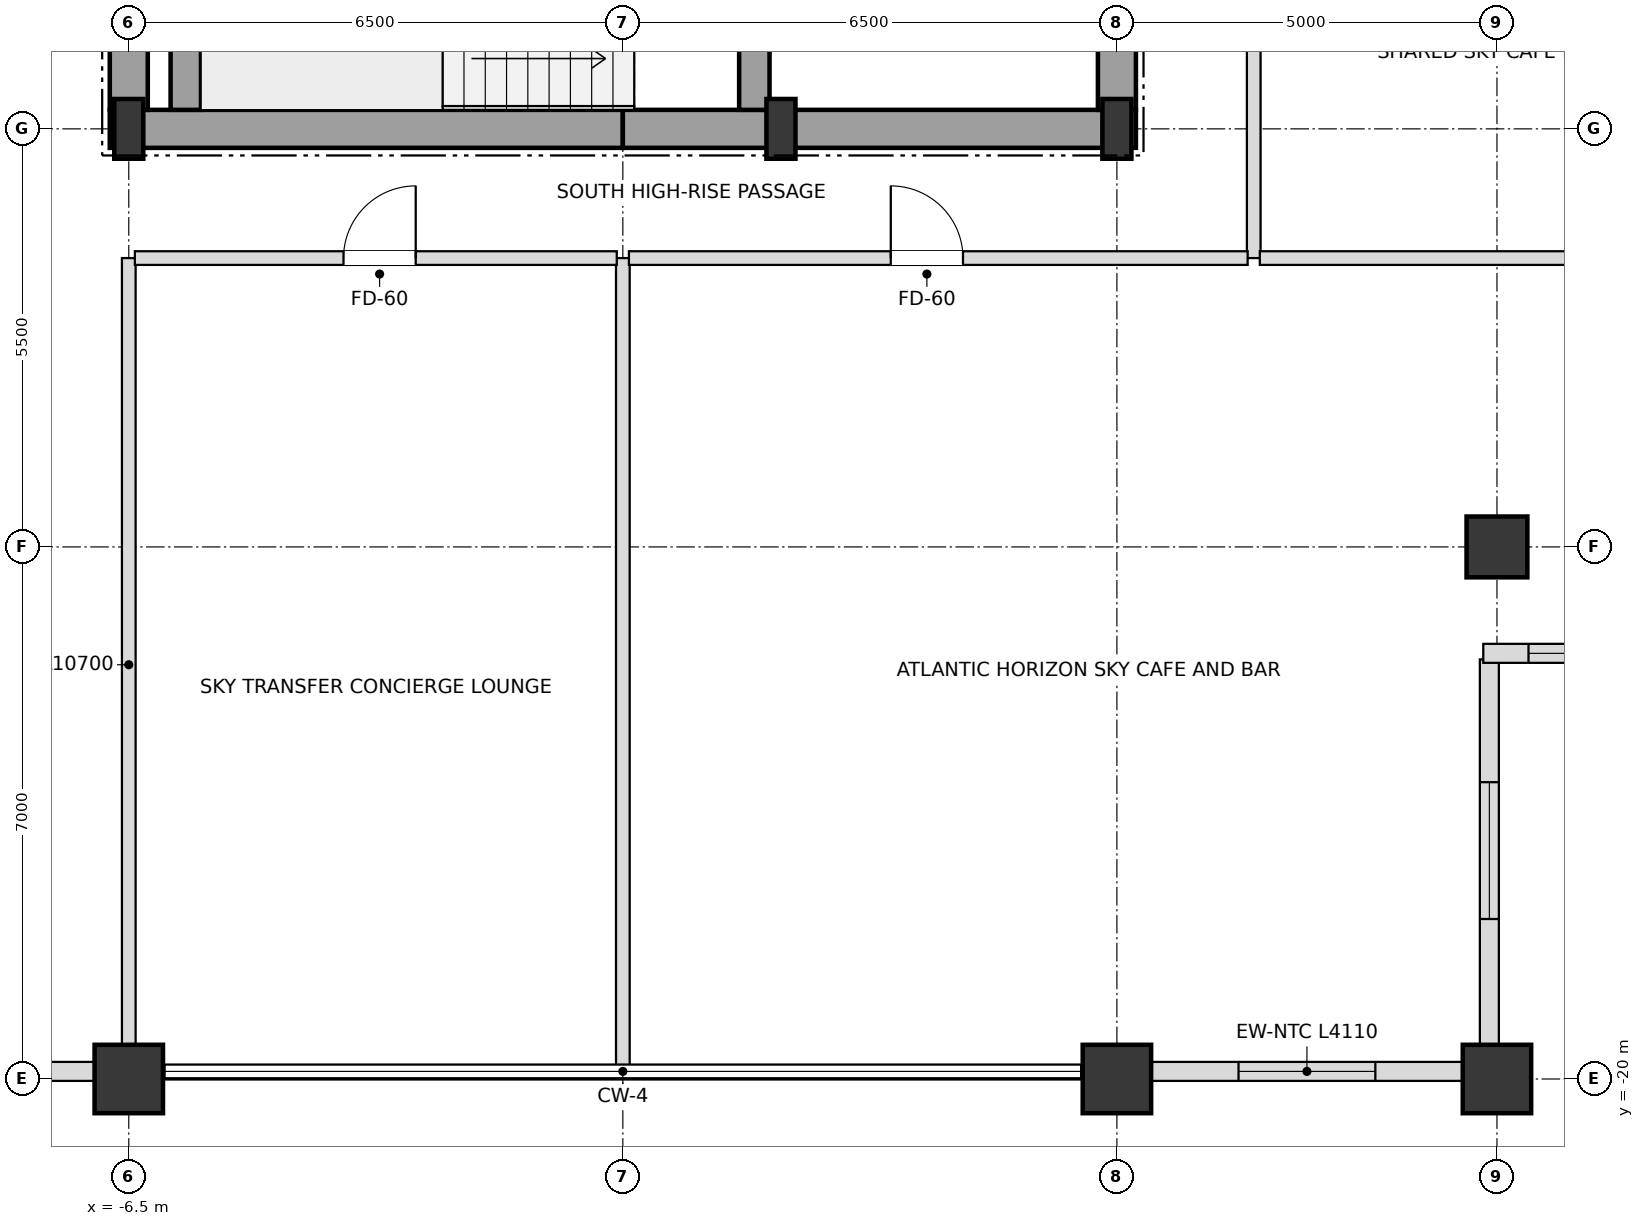
"""IFC4 building model, lengths in metres.
Left out: names, types, materials, properties, quantities, classifications, styles, units other than length and angle.
Written with IfcOpenShell. Run it as: python <this file> out.ifc"""

import sys

from ifc_helpers import new_model, si_unit, direction, frame, frame_2d, origin, origin_2d, place, context, subcontext, project, spatial, rectangle, i_section, extrude, element, fill, save


model = new_model("IFC4")
c1 = context("Model", 3, precision=1e-05, world=origin(), true_north=direction((0.0, 1.0)))
c2 = subcontext(c1, "Body", "Model", "MODEL_VIEW")
j1 = project(units=[si_unit("LENGTHUNIT", "METRE"), si_unit("PLANEANGLEUNIT", "RADIAN")], contexts=[c1])
p1 = place(None, origin())
s1 = spatial("IfcSite", under=j1, at=p1, CompositionType="ELEMENT")
p2 = place(p1, origin())
s2 = spatial("IfcBuilding", under=s1, at=p2, CompositionType="ELEMENT")
p3 = place(p2, frame((0.0, 0.0, 222.3)))
s3 = spatial("IfcBuildingStorey", under=s2, at=p3, CompositionType="ELEMENT", Elevation=222.3)
for number, where, z_axis, x_axis in (
    (1, (-6.5, -7.5, 0.0), (0.0, 0.0, 1.0), (1.0, 0.0, 0.0)),
    (2, (2.08, -7.5, 0.0), (0.0, 0.0, 1.0), (1.0, 0.0, 0.0)),
    (3, (6.5, -7.5, 0.0), (0.0, 0.0, 1.0), (1.0, 0.0, 0.0)),
):
    element("IfcColumn", number, at=place(p3, frame(where, z_axis=z_axis, x_axis=x_axis)), inside=s3, PredefinedType="COLUMN", context=c2, shape_type="SweptSolid", body=[
        extrude(i_section(OverallWidth=0.382, OverallDepth=0.786, WebThickness=0.02, FlangeThickness=0.033, at=origin_2d()), origin(), (0.0, 0.0, 1.0), 3.6),
    ])
for number, where, z_axis, x_axis in (
    (4, (-6.5, -20.0, 0.0), (0.0, 0.0, 1.0), (1.0, 0.0, 0.0)),
    (5, (6.5, -20.0, 0.0), (0.0, 0.0, 1.0), (1.0, 0.0, 0.0)),
    (6, (11.5, -20.0, 0.0), (0.0, 0.0, 1.0), (1.0, 0.0, 0.0)),
):
    element("IfcColumn", number, at=place(p3, frame(where, z_axis=z_axis, x_axis=x_axis)), inside=s3, PredefinedType="USERDEFINED", context=c2, shape_type="SweptSolid", body=[
        extrude(rectangle(XDim=0.9, YDim=0.9, at=origin_2d()), origin(), (0.0, 0.0, 1.0), 3.6),
    ])
p4 = place(p3, frame((11.5, -13.0, 0.0), z_axis=(0.0, 0.0, 1.0), x_axis=(1.0, 0.0, 0.0)))
e7 = element("IfcColumn", 7, at=p4, inside=s3, PredefinedType="COLUMN", context=c2, shape_type="SweptSolid", body=[
    extrude(rectangle(XDim=0.8, YDim=0.8, at=origin_2d()), origin(), (0.0, 0.0, 1.0), 3.6),
])
p5 = place(p3, frame((-11.055, -19.9, 0.0), z_axis=(0.0, 0.0, 1.0), x_axis=(1.0, 0.0, 0.0)))
e8 = element("IfcWall", 8, at=p5, inside=s3, PredefinedType="SOLIDWALL", context=c2, shape_type="SweptSolid", body=[
    extrude(rectangle(XDim=4.11, YDim=0.25, at=frame_2d((2.055, 0.0))), origin(), (0.0, 0.0, 1.0), 2.748),
])
p6 = place(p5, frame((1.155, 0.0, 0.72)))
e9 = element("IfcOpeningElement", 9, at=p6, cuts=e8, PredefinedType="OPENING", context=c2, shape_type="SweptSolid", body=[
    extrude(rectangle(XDim=1.8, YDim=1.68, at=frame_2d((0.9, 0.84))), frame((0.0, 0.135, 0.0), z_axis=(0.0, -1.0, 0.0), x_axis=(1.0, 0.0, 0.0)), (0.0, 0.0, 1.0), 0.27),
])
p7 = place(p3, frame((6.945, -19.9, 0.0), z_axis=(0.0, 0.0, 1.0), x_axis=(1.0, 0.0, 0.0)))
e10 = element("IfcWall", 10, at=p7, inside=s3, PredefinedType="SOLIDWALL", context=c2, shape_type="SweptSolid", body=[
    extrude(rectangle(XDim=4.11, YDim=0.25, at=frame_2d((2.055, 0.0))), origin(), (0.0, 0.0, 1.0), 2.748),
])
p8 = place(p7, frame((1.155, 0.0, 0.72)))
e11 = element("IfcOpeningElement", 11, at=p8, cuts=e10, PredefinedType="OPENING", context=c2, shape_type="SweptSolid", body=[
    extrude(rectangle(XDim=1.8, YDim=1.68, at=frame_2d((0.9, 0.84))), frame((0.0, 0.135, 0.0), z_axis=(0.0, -1.0, 0.0), x_axis=(1.0, 0.0, 0.0)), (0.0, 0.0, 1.0), 0.27),
])
p9 = place(p3, frame((11.4, -19.82, 0.0), z_axis=(0.0, 0.0, 1.0), x_axis=(0.0, 1.0, 0.0)))
e12 = element("IfcWall", 12, at=p9, inside=s3, PredefinedType="SOLIDWALL", context=c2, shape_type="SweptSolid", body=[
    extrude(rectangle(XDim=5.34, YDim=0.25, at=frame_2d((2.67, 0.0))), origin(), (0.0, 0.0, 1.0), 2.748),
])
p10 = place(p9, frame((1.925, 0.0, 0.72)))
e13 = element("IfcOpeningElement", 13, at=p10, cuts=e12, PredefinedType="OPENING", context=c2, shape_type="SweptSolid", body=[
    extrude(rectangle(XDim=1.8, YDim=1.68, at=frame_2d((0.9, 0.84))), frame((0.0, 0.135, 0.0), z_axis=(0.0, -1.0, 0.0), x_axis=(1.0, 0.0, 0.0)), (0.0, 0.0, 1.0), 0.27),
])
p11 = place(p3, frame((11.32, -14.4, 0.0), z_axis=(0.0, 0.0, 1.0), x_axis=(1.0, 0.0, 0.0)))
e14 = element("IfcWall", 14, at=p11, inside=s3, PredefinedType="SOLIDWALL", context=c2, shape_type="SweptSolid", body=[
    extrude(rectangle(XDim=5.66, YDim=0.25, at=frame_2d((2.83, 0.0))), origin(), (0.0, 0.0, 1.0), 2.748),
])
p12 = place(p11, frame((0.595, 0.0, 0.72)))
e15 = element("IfcOpeningElement", 15, at=p12, cuts=e14, PredefinedType="OPENING", context=c2, shape_type="SweptSolid", body=[
    extrude(rectangle(XDim=1.8, YDim=1.68, at=frame_2d((0.9, 0.84))), frame((0.0, 0.135, 0.0), z_axis=(0.0, -1.0, 0.0), x_axis=(1.0, 0.0, 0.0)), (0.0, 0.0, 1.0), 0.27),
])
p13 = place(p11, frame((3.265, 0.0, 0.72)))
e16 = element("IfcOpeningElement", 16, at=p13, cuts=e14, PredefinedType="OPENING", context=c2, shape_type="SweptSolid", body=[
    extrude(rectangle(XDim=1.8, YDim=1.68, at=frame_2d((0.9, 0.84))), frame((0.0, 0.135, 0.0), z_axis=(0.0, -1.0, 0.0), x_axis=(1.0, 0.0, 0.0)), (0.0, 0.0, 1.0), 0.27),
])
for number, where, z_axis, x_axis in (
    (17, (-6.75, -7.5, 0.0), (0.0, 0.0, 1.0), (1.0, 0.0, 0.0)),
    (18, (0.0, -7.5, 0.0), (0.0, 0.0, 1.0), (1.0, 0.0, 0.0)),
):
    element("IfcWall", number, at=place(p3, frame(where, z_axis=z_axis, x_axis=x_axis)), inside=s3, PredefinedType="SHEAR", context=c2, shape_type="SweptSolid", body=[
        extrude(rectangle(XDim=6.75, YDim=0.5, at=frame_2d((3.375, 0.0))), origin(), (0.0, 0.0, 1.0), 3.38),
    ])
p14 = place(p3, frame((-6.5, -7.25, 0.0), z_axis=(0.0, 0.0, 1.0), x_axis=(0.0, 1.0, 0.0)))
e19 = element("IfcWall", 19, at=p14, inside=s3, PredefinedType="SHEAR", context=c2, shape_type="SweptSolid", body=[
    extrude(rectangle(XDim=3.55, YDim=0.5, at=frame_2d((1.775, 0.0))), origin(), (0.0, 0.0, 1.0), 3.38),
])
p15 = place(p3, frame((6.5, -7.25, 0.0), z_axis=(0.0, 0.0, 1.0), x_axis=(0.0, 1.0, 0.0)))
e20 = element("IfcWall", 20, at=p15, inside=s3, PredefinedType="SHEAR", context=c2, shape_type="SweptSolid", body=[
    extrude(rectangle(XDim=5.75, YDim=0.5, at=frame_2d((2.875, 0.0))), origin(), (0.0, 0.0, 1.0), 3.38),
])
p16 = place(p15, frame((0.85, 0.0, 0.0)))
e21 = element("IfcOpeningElement", 21, at=p16, cuts=e20, PredefinedType="OPENING", context=c2, shape_type="SweptSolid", body=[
    extrude(rectangle(XDim=1.05, YDim=2.15, at=frame_2d((0.525, 1.075))), frame((0.0, 0.26, 0.0), z_axis=(0.0, -1.0, 0.0), x_axis=(1.0, 0.0, 0.0)), (0.0, 0.0, 1.0), 0.52),
])
p17 = place(p3, frame((-5.75, -7.25, 0.0), z_axis=(0.0, 0.0, 1.0), x_axis=(0.0, 1.0, 0.0)))
e22 = element("IfcWall", 22, at=p17, inside=s3, PredefinedType="SHEAR", context=c2, shape_type="SweptSolid", body=[
    extrude(rectangle(XDim=2.9, YDim=0.4, at=frame_2d((1.45, 0.0))), origin(), (0.0, 0.0, 1.0), 3.38),
])
p18 = place(p3, frame((1.73, -7.25, 0.0), z_axis=(0.0, 0.0, 1.0), x_axis=(0.0, 1.0, 0.0)))
e23 = element("IfcWall", 23, at=p18, inside=s3, PredefinedType="SHEAR", context=c2, shape_type="SweptSolid", body=[
    extrude(rectangle(XDim=3.3, YDim=0.4, at=frame_2d((1.65, 0.0))), origin(), (0.0, 0.0, 1.0), 3.38),
])
p19 = place(p18, frame((0.9, 0.0, 0.0)))
e24 = element("IfcOpeningElement", 24, at=p19, cuts=e23, PredefinedType="OPENING", context=c2, shape_type="SweptSolid", body=[
    extrude(rectangle(XDim=1.05, YDim=2.15, at=frame_2d((0.525, 1.075))), frame((0.0, 0.21, 0.0), z_axis=(0.0, -1.0, 0.0), x_axis=(1.0, 0.0, 0.0)), (0.0, 0.0, 1.0), 0.42),
])
p20 = place(p3, frame((-6.5, -19.9, 0.0), z_axis=(0.0, 0.0, 1.0), x_axis=(0.0, 1.0, 0.0)))
e25 = element("IfcWall", 25, at=p20, inside=s3, PredefinedType="PARTITIONING", context=c2, shape_type="SweptSolid", body=[
    extrude(rectangle(XDim=10.7, YDim=0.18, at=frame_2d((5.35, 0.0))), origin(), (0.0, 0.0, 1.0), 2.826),
])
p21 = place(p3, frame((0.0, -19.9, 0.0), z_axis=(0.0, 0.0, 1.0), x_axis=(0.0, 1.0, 0.0)))
e26 = element("IfcWall", 26, at=p21, inside=s3, PredefinedType="PARTITIONING", context=c2, shape_type="SweptSolid", body=[
    extrude(rectangle(XDim=10.7, YDim=0.18, at=frame_2d((5.35, 0.0))), origin(), (0.0, 0.0, 1.0), 3.018),
])
p22 = place(p3, frame((8.3, -9.2, 0.0), z_axis=(0.0, 0.0, 1.0), x_axis=(0.0, 1.0, 0.0)))
e27 = element("IfcWall", 27, at=p22, inside=s3, PredefinedType="PARTITIONING", context=c2, shape_type="SweptSolid", body=[
    extrude(rectangle(XDim=5.4, YDim=0.18, at=frame_2d((2.7, 0.0))), origin(), (0.0, 0.0, 1.0), 2.826),
])
p23 = place(p22, frame((3.125, 0.0, 0.0)))
e28 = element("IfcOpeningElement", 28, at=p23, cuts=e27, PredefinedType="OPENING", context=c2, shape_type="SweptSolid", body=[
    extrude(rectangle(XDim=0.95, YDim=2.15, at=frame_2d((0.475, 1.075))), frame((0.0, 0.1, 0.0), z_axis=(0.0, -1.0, 0.0), x_axis=(1.0, 0.0, 0.0)), (0.0, 0.0, 1.0), 0.2),
])
p24 = place(p3, frame((-6.42, -9.2, 0.0), z_axis=(0.0, 0.0, 1.0), x_axis=(1.0, 0.0, 0.0)))
e29 = element("IfcWall", 29, at=p24, inside=s3, PredefinedType="PARTITIONING", context=c2, shape_type="SweptSolid", body=[
    extrude(rectangle(XDim=6.34, YDim=0.18, at=frame_2d((3.17, 0.0))), origin(), (0.0, 0.0, 1.0), 3.38),
])
p25 = place(p24, frame((2.745, 0.0, 0.0)))
e30 = element("IfcOpeningElement", 30, at=p25, cuts=e29, PredefinedType="OPENING", context=c2, shape_type="SweptSolid", body=[
    extrude(rectangle(XDim=0.95, YDim=2.15, at=frame_2d((0.475, 1.075))), frame((0.0, 0.1, 0.0), z_axis=(0.0, -1.0, 0.0), x_axis=(1.0, 0.0, 0.0)), (0.0, 0.0, 1.0), 0.2),
])
p26 = place(p3, frame((0.08, -9.2, 0.0), z_axis=(0.0, 0.0, 1.0), x_axis=(1.0, 0.0, 0.0)))
e31 = element("IfcWall", 31, at=p26, inside=s3, PredefinedType="PARTITIONING", context=c2, shape_type="SweptSolid", body=[
    extrude(rectangle(XDim=8.14, YDim=0.18, at=frame_2d((4.07, 0.0))), origin(), (0.0, 0.0, 1.0), 2.826),
])
p27 = place(p26, frame((3.445, 0.0, 0.0)))
e32 = element("IfcOpeningElement", 32, at=p27, cuts=e31, PredefinedType="OPENING", context=c2, shape_type="SweptSolid", body=[
    extrude(rectangle(XDim=0.95, YDim=2.15, at=frame_2d((0.475, 1.075))), frame((0.0, 0.1, 0.0), z_axis=(0.0, -1.0, 0.0), x_axis=(1.0, 0.0, 0.0)), (0.0, 0.0, 1.0), 0.2),
])
p28 = place(p3, frame((8.38, -9.2, 0.0), z_axis=(0.0, 0.0, 1.0), x_axis=(1.0, 0.0, 0.0)))
e33 = element("IfcWall", 33, at=p28, inside=s3, PredefinedType="PARTITIONING", context=c2, shape_type="SweptSolid", body=[
    extrude(rectangle(XDim=8.44, YDim=0.18, at=frame_2d((4.22, 0.0))), origin(), (0.0, 0.0, 1.0), 3.38),
])
p29 = place(p8, origin())
e34 = element("IfcWindow", 34, at=p29, inside=s3, PartitioningType="SINGLE_PANEL", PredefinedType="WINDOW", context=c2, shape_type="SweptSolid", body=[
    extrude(rectangle(XDim=1.8, YDim=1.68, at=frame_2d((0.9, 0.84))), frame((0.0, 0.03, 0.0), z_axis=(0.0, -1.0, 0.0), x_axis=(1.0, 0.0, 0.0)), (0.0, 0.0, 1.0), 0.06),
])
fill(e11, e34)
p30 = place(p10, origin())
e35 = element("IfcWindow", 35, at=p30, inside=s3, PartitioningType="SINGLE_PANEL", PredefinedType="WINDOW", context=c2, shape_type="SweptSolid", body=[
    extrude(rectangle(XDim=1.8, YDim=1.68, at=frame_2d((0.9, 0.84))), frame((0.0, 0.03, 0.0), z_axis=(0.0, -1.0, 0.0), x_axis=(1.0, 0.0, 0.0)), (0.0, 0.0, 1.0), 0.06),
])
fill(e13, e35)
p31 = place(p12, origin())
e36 = element("IfcWindow", 36, at=p31, inside=s3, PartitioningType="SINGLE_PANEL", PredefinedType="WINDOW", context=c2, shape_type="SweptSolid", body=[
    extrude(rectangle(XDim=1.8, YDim=1.68, at=frame_2d((0.9, 0.84))), frame((0.0, 0.03, 0.0), z_axis=(0.0, -1.0, 0.0), x_axis=(1.0, 0.0, 0.0)), (0.0, 0.0, 1.0), 0.06),
])
fill(e15, e36)
p32 = place(p25, origin())
e37 = element("IfcDoor", 37, at=p32, inside=s3, OperationType="SINGLE_SWING_RIGHT", PredefinedType="DOOR", context=c2, shape_type="SweptSolid", body=[
    extrude(rectangle(XDim=0.95, YDim=2.15, at=frame_2d((0.475, 1.075))), frame((0.0, 0.025, 0.0), z_axis=(0.0, -1.0, 0.0), x_axis=(1.0, 0.0, 0.0)), (0.0, 0.0, 1.0), 0.05),
])
fill(e30, e37)
p33 = place(p27, origin())
e38 = element("IfcDoor", 38, at=p33, inside=s3, OperationType="SINGLE_SWING_LEFT", PredefinedType="DOOR", context=c2, shape_type="SweptSolid", body=[
    extrude(rectangle(XDim=0.95, YDim=2.15, at=frame_2d((0.475, 1.075))), frame((0.0, 0.025, 0.0), z_axis=(0.0, -1.0, 0.0), x_axis=(1.0, 0.0, 0.0)), (0.0, 0.0, 1.0), 0.05),
])
fill(e32, e38)
save(model, sys.argv[1])
